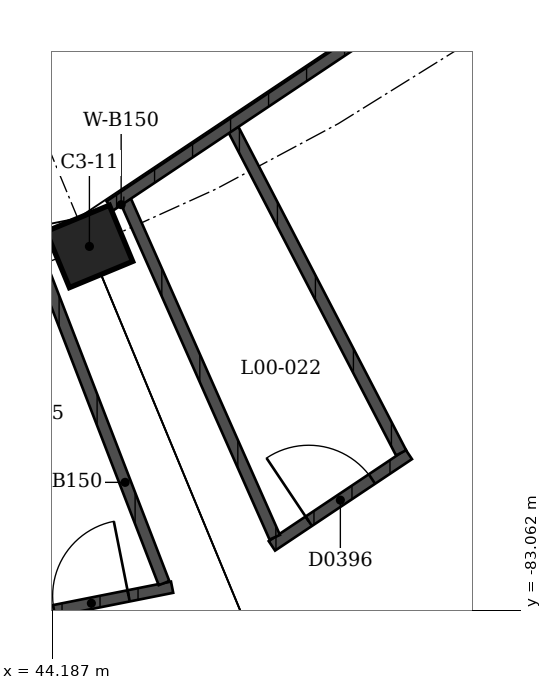
"""IFC4 building model, lengths in metres.
Left out: names, types, materials, properties, quantities, classifications, styles, units other than length and angle.
Written with IfcOpenShell. Run it as: python <this file> out.ifc"""

import sys

from ifc_helpers import new_model, si_unit, direction, frame, frame_2d, origin, origin_2d, place, context, subcontext, project, spatial, rectangle, extrude, element, fill, save


model = new_model("IFC4")
c1 = context("Model", 3, precision=1e-05, world=origin(), true_north=direction((0.0, 1.0)))
c2 = subcontext(c1, "Body", "Model", "MODEL_VIEW")
j1 = project(units=[si_unit("LENGTHUNIT", "METRE"), si_unit("PLANEANGLEUNIT", "RADIAN")], contexts=[c1])
p1 = place(None, origin())
s1 = spatial("IfcSite", under=j1, at=p1, CompositionType="ELEMENT")
p2 = place(p1, origin())
s2 = spatial("IfcBuilding", under=s1, at=p2, CompositionType="ELEMENT")
p3 = place(p2, origin())
s3 = spatial("IfcBuildingStorey", under=s2, at=p3, CompositionType="ELEMENT", Elevation=0.0)
p4 = place(p3, frame((44.677, -78.276, 0.0), z_axis=(0.0, 0.0, 1.0), x_axis=(0.923879532511, 0.382683432365, 0.0)))
e1 = element("IfcColumn", 1, at=p4, inside=s3, PredefinedType="COLUMN", context=c2, shape_type="SweptSolid", body=[
    extrude(rectangle(XDim=0.9, YDim=0.8, at=origin_2d()), origin(), (0.0, 0.0, 1.0), 4.5),
])
p5 = place(p3, frame((48.879, -81.012, 0.0), z_axis=(0.0, 0.0, 1.0), x_axis=(-0.831460345356, -0.555584101735, 0.0)))
e2 = element("IfcWall", 2, at=p5, inside=s3, PredefinedType="SOLIDWALL", context=c2, shape_type="SweptSolid", body=[
    extrude(rectangle(XDim=2.167, YDim=0.15, at=frame_2d((1.083, 0.0))), origin(), (0.0, 0.0, 1.0), 3.0),
])
p6 = place(p5, frame((0.583, 0.0, 0.0)))
e3 = element("IfcOpeningElement", 3, at=p6, cuts=e2, PredefinedType="OPENING", context=c2, shape_type="SweptSolid", body=[
    extrude(rectangle(XDim=1.0, YDim=2.1, at=frame_2d((0.5, 1.05))), frame((0.0, 0.075, 0.0), z_axis=(0.0, -1.0, 0.0), x_axis=(1.0, 0.0, 0.0)), (0.0, 0.0, 1.0), 0.15),
])
p7 = place(p3, frame((46.54, -76.677, 0.0), z_axis=(0.0, 0.0, 1.0), x_axis=(0.460446193467, -0.887687615618, 0.0)))
e4 = element("IfcWall", 4, at=p7, inside=s3, PredefinedType="SOLIDWALL", context=c2, shape_type="SweptSolid", body=[
    extrude(rectangle(XDim=4.86, YDim=0.15, at=frame_2d((2.43, 0.0))), origin(), (0.0, 0.0, 1.0), 3.0),
])
p8 = place(p3, frame((45.129, -77.62, 0.0), z_axis=(0.0, 0.0, 1.0), x_axis=(0.405098626615, -0.914272991352, 0.0)))
e5 = element("IfcWall", 5, at=p8, inside=s3, PredefinedType="SOLIDWALL", context=c2, shape_type="SweptSolid", body=[
    extrude(rectangle(XDim=4.903, YDim=0.15, at=frame_2d((2.451, 0.0))), origin(), (0.0, 0.0, 1.0), 3.0),
])
p9 = place(p3, frame((43.64, -83.182, 0.0), z_axis=(0.0, 0.0, 1.0), x_axis=(0.980788176969, 0.195075759432, 0.0)))
e6 = element("IfcWall", 6, at=p9, inside=s3, PredefinedType="SOLIDWALL", context=c2, shape_type="SweptSolid", body=[
    extrude(rectangle(XDim=2.166, YDim=0.15, at=frame_2d((1.083, 0.0))), origin(), (0.0, 0.0, 1.0), 3.0),
])
p10 = place(p9, frame((0.583, 0.0, 0.0)))
e7 = element("IfcOpeningElement", 7, at=p10, cuts=e6, PredefinedType="OPENING", context=c2, shape_type="SweptSolid", body=[
    extrude(rectangle(XDim=1.0, YDim=2.1, at=frame_2d((0.5, 1.05))), frame((0.0, 0.075, 0.0), z_axis=(0.0, -1.0, 0.0), x_axis=(1.0, 0.0, 0.0)), (0.0, 0.0, 1.0), 0.15),
])
p11 = place(p3, frame((43.893, -78.132, 0.0), z_axis=(0.0, 0.0, 1.0), x_axis=(0.360073313022, -0.932924010437, 0.0)))
e8 = element("IfcWall", 8, at=p11, inside=s3, PredefinedType="SOLIDWALL", context=c2, shape_type="SweptSolid", body=[
    extrude(rectangle(XDim=4.903, YDim=0.15, at=frame_2d((2.451, 0.0))), origin(), (0.0, 0.0, 1.0), 3.0),
])
p12 = place(p3, frame((53.135, -72.271, 0.0), z_axis=(0.0, 0.0, 1.0), x_axis=(-0.83147031613, -0.555569179667, 0.0)))
e9 = element("IfcWall", 9, at=p12, inside=s3, PredefinedType="SOLIDWALL", context=c2, shape_type="SweptSolid", body=[
    extrude(rectangle(XDim=9.851, YDim=0.15, at=frame_2d((4.926, 0.0))), origin(), (0.0, 0.0, 1.0), 3.0),
])
p13 = place(p6, origin())
e10 = element("IfcDoor", 10, at=p13, inside=s3, OperationType="SINGLE_SWING_RIGHT", PredefinedType="DOOR", context=c2, shape_type="SweptSolid", body=[
    extrude(rectangle(XDim=1.0, YDim=2.1, at=frame_2d((0.5, 1.05))), frame((0.0, 0.025, 0.0), z_axis=(0.0, -1.0, 0.0), x_axis=(1.0, 0.0, 0.0)), (0.0, 0.0, 1.0), 0.05),
])
fill(e3, e10)
p14 = place(p10, origin())
e11 = element("IfcDoor", 11, at=p14, inside=s3, OperationType="SINGLE_SWING_LEFT", PredefinedType="DOOR", context=c2, shape_type="SweptSolid", body=[
    extrude(rectangle(XDim=1.0, YDim=2.1, at=frame_2d((0.5, 1.05))), frame((0.0, 0.025, 0.0), z_axis=(0.0, -1.0, 0.0), x_axis=(1.0, 0.0, 0.0)), (0.0, 0.0, 1.0), 0.05),
])
fill(e7, e11)
save(model, sys.argv[1])
